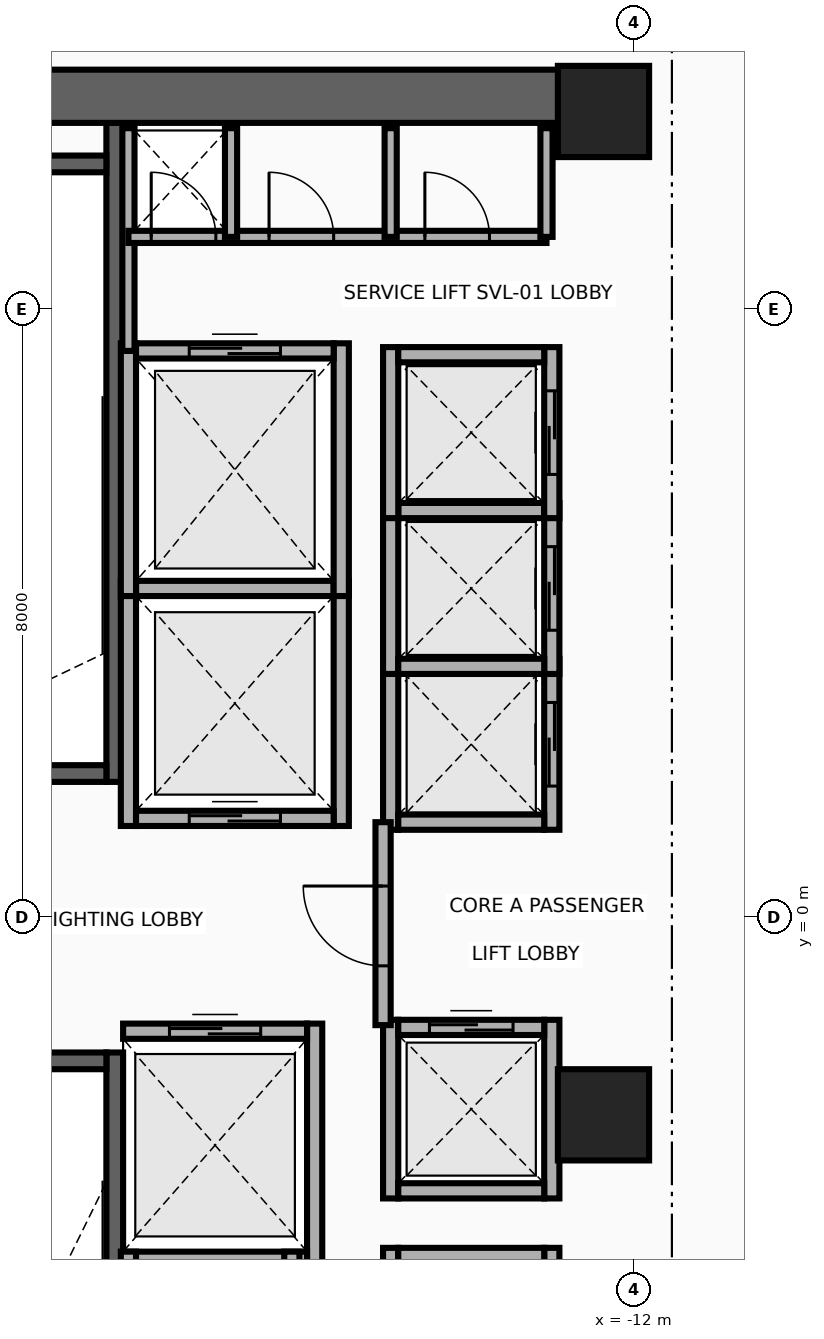
"""IFC4 building model, lengths in metres.
Left out: names, types, materials, properties, quantities, classifications, styles, units other than length and angle.
Written with IfcOpenShell. Run it as: python <this file> out.ifc"""

import sys

from ifc_helpers import new_model, si_unit, direction, frame, frame_2d, origin, origin_2d, place, context, subcontext, project, spatial, rectangle, extrude, source, transform, mapped, element, fill, save


model = new_model("IFC4")
c1 = context("Model", 3, precision=1e-05, world=origin(), true_north=direction((0.0, 1.0)))
c2 = subcontext(c1, "Body", "Model", "MODEL_VIEW")
j1 = project(units=[si_unit("LENGTHUNIT", "METRE"), si_unit("PLANEANGLEUNIT", "RADIAN")], contexts=[c1])
p1 = place(None, origin())
s1 = spatial("IfcSite", under=j1, at=p1, CompositionType="ELEMENT")
p2 = place(p1, origin())
s2 = spatial("IfcBuilding", under=s1, at=p2, CompositionType="ELEMENT")
p3 = place(p2, frame((0.0, 0.0, 101.1)))
s3 = spatial("IfcBuildingStorey", under=s2, at=p3, CompositionType="ELEMENT", Elevation=101.1)
p4 = place(p3, frame((-18.83, 1.78, 0.0), z_axis=(0.0, 0.0, 1.0), x_axis=(0.0, 1.0, 0.0)))
e1 = element("IfcWall", 1, at=p4, inside=s3, PredefinedType="SHEAR", context=c2, shape_type="SweptSolid", body=[
    extrude(rectangle(XDim=8.67, YDim=0.22, at=frame_2d((4.335, 0.0))), origin(), (0.0, 0.0, 1.0), 4.36),
])
p5 = place(p3, frame((-22.05, 1.89, 0.0), z_axis=(0.0, 0.0, 1.0), x_axis=(1.0, 0.0, 0.0)))
e2 = element("IfcWall", 2, at=p5, inside=s3, PredefinedType="SHEAR", context=c2, shape_type="SweptSolid", body=[
    extrude(rectangle(XDim=3.11, YDim=0.22, at=frame_2d((1.555, 0.0))), origin(), (0.0, 0.0, 1.0), 4.36),
])
p6 = place(p5, frame((1.0, 0.0, 0.0)))
e3 = element("IfcOpeningElement", 3, at=p6, cuts=e2, PredefinedType="OPENING", context=c2, shape_type="SweptSolid", body=[
    extrude(rectangle(XDim=1.1, YDim=2.15, at=frame_2d((0.55, 1.075))), frame((0.0, 0.125, 0.0), z_axis=(0.0, -1.0, 0.0), x_axis=(1.0, 0.0, 0.0)), (0.0, 0.0, 1.0), 0.25),
])
p7 = place(p3, frame((-22.05, 9.91, 0.0), z_axis=(0.0, 0.0, 1.0), x_axis=(1.0, 0.0, 0.0)))
e4 = element("IfcWall", 4, at=p7, inside=s3, PredefinedType="SHEAR", context=c2, shape_type="SweptSolid", body=[
    extrude(rectangle(XDim=3.11, YDim=0.22, at=frame_2d((1.555, 0.0))), origin(), (0.0, 0.0, 1.0), 4.36),
])
p8 = place(p3, frame((-18.83, -10.45, 0.0), z_axis=(0.0, 0.0, 1.0), x_axis=(0.0, 1.0, 0.0)))
e5 = element("IfcWall", 5, at=p8, inside=s3, PredefinedType="SHEAR", context=c2, shape_type="SweptSolid", body=[
    extrude(rectangle(XDim=8.67, YDim=0.22, at=frame_2d((4.335, 0.0))), origin(), (0.0, 0.0, 1.0), 4.36),
])
p9 = place(p3, frame((-22.05, -1.89, 0.0), z_axis=(0.0, 0.0, 1.0), x_axis=(1.0, 0.0, 0.0)))
e6 = element("IfcWall", 6, at=p9, inside=s3, PredefinedType="SHEAR", context=c2, shape_type="SweptSolid", body=[
    extrude(rectangle(XDim=3.11, YDim=0.22, at=frame_2d((1.555, 0.0))), origin(), (0.0, 0.0, 1.0), 4.36),
])
p10 = place(p9, frame((1.0, 0.0, 0.0)))
e7 = element("IfcOpeningElement", 7, at=p10, cuts=e6, PredefinedType="OPENING", context=c2, shape_type="SweptSolid", body=[
    extrude(rectangle(XDim=1.1, YDim=2.15, at=frame_2d((0.55, 1.075))), frame((0.0, 0.125, 0.0), z_axis=(0.0, -1.0, 0.0), x_axis=(1.0, 0.0, 0.0)), (0.0, 0.0, 1.0), 0.25),
])
p11 = place(p3, frame((-22.65, 10.8, 0.0), z_axis=(0.0, 0.0, 1.0), x_axis=(1.0, 0.0, 0.0)))
e8 = element("IfcWall", 8, at=p11, inside=s3, PredefinedType="SHEAR", context=c2, shape_type="SweptSolid", body=[
    extrude(rectangle(XDim=10.25, YDim=0.7, at=frame_2d((5.125, 0.0))), origin(), (0.0, 0.0, 1.0), 4.36),
])
m1 = source(origin(), c2, "Body", "SweptSolid", [
    extrude(rectangle(XDim=1.2, YDim=1.2, at=origin_2d()), origin(), (0.0, 0.0, 1.0), 4.6),
])
for number, where, z_axis, x_axis in (
    (9, (-12.4, -2.6, 0.0), (0.0, 0.0, 1.0), (1.0, 0.0, 0.0)),
    (10, (-12.4, 10.6, 0.0), (0.0, 0.0, 1.0), (1.0, 0.0, 0.0)),
):
    element("IfcColumn", number, at=place(p3, frame(where, z_axis=z_axis, x_axis=x_axis)), inside=s3, PredefinedType="COLUMN", context=c2, shape_type="MappedRepresentation", body=[
        mapped(m1, transform((0.0, 0.0, 0.0), x_axis=(1.0, 0.0, 0.0), y_axis=(0.0, 1.0, 0.0), z_axis=(0.0, 0.0, 1.0), scale=1.0)),
    ])
for number, where, z_axis, x_axis in (
    (11, (-18.65, 1.2, 0.0), (0.0, 0.0, 1.0), (0.0, 1.0, 0.0)),
    (12, (-15.85, 1.2, 0.0), (0.0, 0.0, 1.0), (0.0, 1.0, 0.0)),
):
    element("IfcWall", number, at=place(p3, frame(where, z_axis=z_axis, x_axis=x_axis)), inside=s3, PredefinedType="MOVABLE", context=c2, shape_type="SweptSolid", body=[
        extrude(rectangle(XDim=3.225, YDim=0.2, at=frame_2d((1.613, 0.0))), origin(), (0.0, 0.0, 1.0), 4.36),
    ])
p12 = place(p3, frame((-18.55, 1.3, 0.0), z_axis=(0.0, 0.0, 1.0), x_axis=(1.0, 0.0, 0.0)))
e13 = element("IfcWall", 13, at=p12, inside=s3, PredefinedType="MOVABLE", context=c2, shape_type="SweptSolid", body=[
    extrude(rectangle(XDim=2.6, YDim=0.2, at=frame_2d((1.3, 0.0))), origin(), (0.0, 0.0, 1.0), 4.36),
])
p13 = place(p12, frame((0.7, 0.0, 0.0)))
e14 = element("IfcOpeningElement", 14, at=p13, cuts=e13, PredefinedType="OPENING", context=c2, shape_type="SweptSolid", body=[
    extrude(rectangle(XDim=1.2, YDim=2.1, at=frame_2d((0.6, 1.05))), frame((0.0, 0.115, 0.0), z_axis=(0.0, -1.0, 0.0), x_axis=(1.0, 0.0, 0.0)), (0.0, 0.0, 1.0), 0.23),
])
p14 = place(p3, frame((-18.55, 4.325, 0.0), z_axis=(0.0, 0.0, 1.0), x_axis=(1.0, 0.0, 0.0)))
e15 = element("IfcWall", 15, at=p14, inside=s3, PredefinedType="MOVABLE", context=c2, shape_type="SweptSolid", body=[
    extrude(rectangle(XDim=2.6, YDim=0.2, at=frame_2d((1.3, 0.0))), origin(), (0.0, 0.0, 1.0), 4.36),
])
p15 = place(p3, frame((-16.2, -4.6, 0.0), z_axis=(0.0, 0.0, 1.0), x_axis=(0.0, 1.0, 0.0)))
e16 = element("IfcWall", 16, at=p15, inside=s3, PredefinedType="MOVABLE", context=c2, shape_type="SweptSolid", body=[
    extrude(rectangle(XDim=3.2, YDim=0.2, at=frame_2d((1.6, 0.0))), origin(), (0.0, 0.0, 1.0), 4.36),
])
p16 = place(p3, frame((-18.72, -4.5, 0.0), z_axis=(0.0, 0.0, 1.0), x_axis=(1.0, 0.0, 0.0)))
e17 = element("IfcWall", 17, at=p16, inside=s3, PredefinedType="MOVABLE", context=c2, shape_type="SweptSolid", body=[
    extrude(rectangle(XDim=2.42, YDim=0.2, at=frame_2d((1.21, 0.0))), origin(), (0.0, 0.0, 1.0), 4.36),
])
p17 = place(p3, frame((-18.72, -1.5, 0.0), z_axis=(0.0, 0.0, 1.0), x_axis=(1.0, 0.0, 0.0)))
e18 = element("IfcWall", 18, at=p17, inside=s3, PredefinedType="MOVABLE", context=c2, shape_type="SweptSolid", body=[
    extrude(rectangle(XDim=2.42, YDim=0.2, at=frame_2d((1.21, 0.0))), origin(), (0.0, 0.0, 1.0), 4.36),
])
p18 = place(p17, frame((0.61, 0.0, 0.0)))
e19 = element("IfcOpeningElement", 19, at=p18, cuts=e18, PredefinedType="OPENING", context=c2, shape_type="SweptSolid", body=[
    extrude(rectangle(XDim=1.2, YDim=2.1, at=frame_2d((0.6, 1.05))), frame((0.0, 0.115, 0.0), z_axis=(0.0, -1.0, 0.0), x_axis=(1.0, 0.0, 0.0)), (0.0, 0.0, 1.0), 0.23),
])
for number, where, z_axis, x_axis in (
    (20, (-18.65, 4.225, 0.0), (0.0, 0.0, 1.0), (0.0, 1.0, 0.0)),
    (21, (-15.85, 4.225, 0.0), (0.0, 0.0, 1.0), (0.0, 1.0, 0.0)),
):
    element("IfcWall", number, at=place(p3, frame(where, z_axis=z_axis, x_axis=x_axis)), inside=s3, PredefinedType="MOVABLE", context=c2, shape_type="SweptSolid", body=[
        extrude(rectangle(XDim=3.325, YDim=0.2, at=frame_2d((1.663, 0.0))), origin(), (0.0, 0.0, 1.0), 4.36),
    ])
p19 = place(p3, frame((-18.55, 7.45, 0.0), z_axis=(0.0, 0.0, 1.0), x_axis=(1.0, 0.0, 0.0)))
e22 = element("IfcWall", 22, at=p19, inside=s3, PredefinedType="MOVABLE", context=c2, shape_type="SweptSolid", body=[
    extrude(rectangle(XDim=2.6, YDim=0.2, at=frame_2d((1.3, 0.0))), origin(), (0.0, 0.0, 1.0), 4.36),
])
p20 = place(p19, frame((0.7, 0.0, 0.0)))
e23 = element("IfcOpeningElement", 23, at=p20, cuts=e22, PredefinedType="OPENING", context=c2, shape_type="SweptSolid", body=[
    extrude(rectangle(XDim=1.2, YDim=2.1, at=frame_2d((0.6, 1.05))), frame((0.0, 0.115, 0.0), z_axis=(0.0, -1.0, 0.0), x_axis=(1.0, 0.0, 0.0)), (0.0, 0.0, 1.0), 0.23),
])
for number, where, z_axis, x_axis in (
    (24, (-15.2, -6.7, 0.0), (0.0, 0.0, 1.0), (0.0, 1.0, 0.0)),
    (25, (-13.08, -6.7, 0.0), (0.0, 0.0, 1.0), (0.0, 1.0, 0.0)),
):
    element("IfcWall", number, at=place(p3, frame(where, z_axis=z_axis, x_axis=x_axis)), inside=s3, PredefinedType="MOVABLE", context=c2, shape_type="SweptSolid", body=[
        extrude(rectangle(XDim=2.35, YDim=0.2, at=frame_2d((1.175, 0.0))), origin(), (0.0, 0.0, 1.0), 4.36),
    ])
p21 = place(p3, frame((-15.1, -4.45, 0.0), z_axis=(0.0, 0.0, 1.0), x_axis=(1.0, 0.0, 0.0)))
e26 = element("IfcWall", 26, at=p21, inside=s3, PredefinedType="MOVABLE", context=c2, shape_type="SweptSolid", body=[
    extrude(rectangle(XDim=1.92, YDim=0.2, at=frame_2d((0.96, 0.0))), origin(), (0.0, 0.0, 1.0), 4.36),
])
p22 = place(p3, frame((-15.2, 1.15, 0.0), z_axis=(0.0, 0.0, 1.0), x_axis=(0.0, 1.0, 0.0)))
e27 = element("IfcWall", 27, at=p22, inside=s3, PredefinedType="MOVABLE", context=c2, shape_type="SweptSolid", body=[
    extrude(rectangle(XDim=2.25, YDim=0.2, at=frame_2d((1.125, 0.0))), origin(), (0.0, 0.0, 1.0), 4.36),
])
p23 = place(p3, frame((-13.08, 1.15, 0.0), z_axis=(0.0, 0.0, 1.0), x_axis=(0.0, 1.0, 0.0)))
e28 = element("IfcWall", 28, at=p23, inside=s3, PredefinedType="MOVABLE", context=c2, shape_type="SweptSolid", body=[
    extrude(rectangle(XDim=2.25, YDim=0.2, at=frame_2d((1.125, 0.0))), origin(), (0.0, 0.0, 1.0), 4.36),
])
p24 = place(p23, frame((0.575, 0.0, 0.0)))
e29 = element("IfcOpeningElement", 29, at=p24, cuts=e28, PredefinedType="OPENING", context=c2, shape_type="SweptSolid", body=[
    extrude(rectangle(XDim=1.1, YDim=2.1, at=frame_2d((0.55, 1.05))), frame((0.0, 0.115, 0.0), z_axis=(0.0, -1.0, 0.0), x_axis=(1.0, 0.0, 0.0)), (0.0, 0.0, 1.0), 0.23),
])
p25 = place(p3, frame((-15.1, 1.25, 0.0), z_axis=(0.0, 0.0, 1.0), x_axis=(1.0, 0.0, 0.0)))
e30 = element("IfcWall", 30, at=p25, inside=s3, PredefinedType="MOVABLE", context=c2, shape_type="SweptSolid", body=[
    extrude(rectangle(XDim=1.92, YDim=0.2, at=frame_2d((0.96, 0.0))), origin(), (0.0, 0.0, 1.0), 4.36),
])
p26 = place(p3, frame((-15.2, 3.2, 0.0), z_axis=(0.0, 0.0, 1.0), x_axis=(0.0, 1.0, 0.0)))
e31 = element("IfcWall", 31, at=p26, inside=s3, PredefinedType="MOVABLE", context=c2, shape_type="SweptSolid", body=[
    extrude(rectangle(XDim=2.25, YDim=0.2, at=frame_2d((1.125, 0.0))), origin(), (0.0, 0.0, 1.0), 4.36),
])
p27 = place(p3, frame((-13.08, 3.2, 0.0), z_axis=(0.0, 0.0, 1.0), x_axis=(0.0, 1.0, 0.0)))
e32 = element("IfcWall", 32, at=p27, inside=s3, PredefinedType="MOVABLE", context=c2, shape_type="SweptSolid", body=[
    extrude(rectangle(XDim=2.25, YDim=0.2, at=frame_2d((1.125, 0.0))), origin(), (0.0, 0.0, 1.0), 4.36),
])
p28 = place(p27, frame((0.575, 0.0, 0.0)))
e33 = element("IfcOpeningElement", 33, at=p28, cuts=e32, PredefinedType="OPENING", context=c2, shape_type="SweptSolid", body=[
    extrude(rectangle(XDim=1.1, YDim=2.1, at=frame_2d((0.55, 1.05))), frame((0.0, 0.115, 0.0), z_axis=(0.0, -1.0, 0.0), x_axis=(1.0, 0.0, 0.0)), (0.0, 0.0, 1.0), 0.23),
])
for number, where, z_axis, x_axis in (
    (34, (-15.1, 3.3, 0.0), (0.0, 0.0, 1.0), (1.0, 0.0, 0.0)),
    (35, (-15.1, 5.35, 0.0), (0.0, 0.0, 1.0), (1.0, 0.0, 0.0)),
):
    element("IfcWall", number, at=place(p3, frame(where, z_axis=z_axis, x_axis=x_axis)), inside=s3, PredefinedType="MOVABLE", context=c2, shape_type="SweptSolid", body=[
        extrude(rectangle(XDim=1.92, YDim=0.2, at=frame_2d((0.96, 0.0))), origin(), (0.0, 0.0, 1.0), 4.36),
    ])
p29 = place(p3, frame((-15.2, 5.25, 0.0), z_axis=(0.0, 0.0, 1.0), x_axis=(0.0, 1.0, 0.0)))
e36 = element("IfcWall", 36, at=p29, inside=s3, PredefinedType="MOVABLE", context=c2, shape_type="SweptSolid", body=[
    extrude(rectangle(XDim=2.25, YDim=0.2, at=frame_2d((1.125, 0.0))), origin(), (0.0, 0.0, 1.0), 4.36),
])
p30 = place(p3, frame((-13.08, 5.25, 0.0), z_axis=(0.0, 0.0, 1.0), x_axis=(0.0, 1.0, 0.0)))
e37 = element("IfcWall", 37, at=p30, inside=s3, PredefinedType="MOVABLE", context=c2, shape_type="SweptSolid", body=[
    extrude(rectangle(XDim=2.25, YDim=0.2, at=frame_2d((1.125, 0.0))), origin(), (0.0, 0.0, 1.0), 4.36),
])
p31 = place(p30, frame((0.575, 0.0, 0.0)))
e38 = element("IfcOpeningElement", 38, at=p31, cuts=e37, PredefinedType="OPENING", context=c2, shape_type="SweptSolid", body=[
    extrude(rectangle(XDim=1.1, YDim=2.1, at=frame_2d((0.55, 1.05))), frame((0.0, 0.115, 0.0), z_axis=(0.0, -1.0, 0.0), x_axis=(1.0, 0.0, 0.0)), (0.0, 0.0, 1.0), 0.23),
])
p32 = place(p3, frame((-15.1, 7.4, 0.0), z_axis=(0.0, 0.0, 1.0), x_axis=(1.0, 0.0, 0.0)))
e39 = element("IfcWall", 39, at=p32, inside=s3, PredefinedType="MOVABLE", context=c2, shape_type="SweptSolid", body=[
    extrude(rectangle(XDim=1.92, YDim=0.2, at=frame_2d((0.96, 0.0))), origin(), (0.0, 0.0, 1.0), 4.36),
])
for number, where, z_axis, x_axis in (
    (40, (-18.65, -6.7, 0.0), (0.0, 0.0, 1.0), (0.0, 1.0, 0.0)),
    (41, (-16.5, -6.7, 0.0), (0.0, 0.0, 1.0), (0.0, 1.0, 0.0)),
):
    element("IfcWall", number, at=place(p3, frame(where, z_axis=z_axis, x_axis=x_axis)), inside=s3, PredefinedType="MOVABLE", context=c2, shape_type="SweptSolid", body=[
        extrude(rectangle(XDim=2.3, YDim=0.2, at=frame_2d((1.15, 0.0))), origin(), (0.0, 0.0, 1.0), 4.36),
    ])
for number, where, z_axis, x_axis in (
    (42, (-15.2, -3.7, 0.0), (0.0, 0.0, 1.0), (0.0, 1.0, 0.0)),
    (43, (-13.08, -3.7, 0.0), (0.0, 0.0, 1.0), (0.0, 1.0, 0.0)),
):
    element("IfcWall", number, at=place(p3, frame(where, z_axis=z_axis, x_axis=x_axis)), inside=s3, PredefinedType="MOVABLE", context=c2, shape_type="SweptSolid", body=[
        extrude(rectangle(XDim=2.35, YDim=0.2, at=frame_2d((1.175, 0.0))), origin(), (0.0, 0.0, 1.0), 4.36),
    ])
p33 = place(p3, frame((-15.1, -3.6, 0.0), z_axis=(0.0, 0.0, 1.0), x_axis=(1.0, 0.0, 0.0)))
e44 = element("IfcWall", 44, at=p33, inside=s3, PredefinedType="MOVABLE", context=c2, shape_type="SweptSolid", body=[
    extrude(rectangle(XDim=1.92, YDim=0.2, at=frame_2d((0.96, 0.0))), origin(), (0.0, 0.0, 1.0), 4.36),
])
p34 = place(p3, frame((-15.1, -1.45, 0.0), z_axis=(0.0, 0.0, 1.0), x_axis=(1.0, 0.0, 0.0)))
e45 = element("IfcWall", 45, at=p34, inside=s3, PredefinedType="MOVABLE", context=c2, shape_type="SweptSolid", body=[
    extrude(rectangle(XDim=1.92, YDim=0.2, at=frame_2d((0.96, 0.0))), origin(), (0.0, 0.0, 1.0), 4.36),
])
p35 = place(p34, frame((0.41, 0.0, 0.0)))
e46 = element("IfcOpeningElement", 46, at=p35, cuts=e45, PredefinedType="OPENING", context=c2, shape_type="SweptSolid", body=[
    extrude(rectangle(XDim=1.1, YDim=2.1, at=frame_2d((0.55, 1.05))), frame((0.0, 0.115, 0.0), z_axis=(0.0, -1.0, 0.0), x_axis=(1.0, 0.0, 0.0)), (0.0, 0.0, 1.0), 0.23),
])
p36 = place(p3, frame((-15.3, -1.42, 0.0), z_axis=(0.0, 0.0, 1.0), x_axis=(0.0, 1.0, 0.0)))
e47 = element("IfcWall", 47, at=p36, inside=s3, PredefinedType="PARTITIONING", context=c2, shape_type="SweptSolid", body=[
    extrude(rectangle(XDim=2.67, YDim=0.2, at=frame_2d((1.335, 0.0))), origin(), (0.0, 0.0, 1.0), 4.36),
])
p37 = place(p36, frame((0.78, 0.0, 0.0)))
e48 = element("IfcOpeningElement", 48, at=p37, cuts=e47, PredefinedType="OPENING", context=c2, shape_type="SweptSolid", body=[
    extrude(rectangle(XDim=1.05, YDim=2.15, at=frame_2d((0.525, 1.075))), frame((0.0, 0.115, 0.0), z_axis=(0.0, -1.0, 0.0), x_axis=(1.0, 0.0, 0.0)), (0.0, 0.0, 1.0), 0.23),
])
p38 = place(p3, frame((-18.65, 7.45, 0.0), z_axis=(0.0, 0.0, 1.0), x_axis=(0.0, 1.0, 0.0)))
e49 = element("IfcWall", 49, at=p38, inside=s3, PredefinedType="PARTITIONING", context=c2, shape_type="SweptSolid", body=[
    extrude(rectangle(XDim=2.93, YDim=0.16, at=frame_2d((1.465, 0.0))), origin(), (0.0, 0.0, 1.0), 4.36),
])
p39 = place(p3, frame((-18.65, 8.95, 0.0), z_axis=(0.0, 0.0, 1.0), x_axis=(1.0, 0.0, 0.0)))
e50 = element("IfcWall", 50, at=p39, inside=s3, PredefinedType="PARTITIONING", context=c2, shape_type="SweptSolid", body=[
    extrude(rectangle(XDim=5.5, YDim=0.16, at=frame_2d((2.75, 0.0))), origin(), (0.0, 0.0, 1.0), 4.36),
])
p40 = place(p39, frame((0.3, 0.0, 0.0)))
e51 = element("IfcOpeningElement", 51, at=p40, cuts=e50, PredefinedType="OPENING", context=c2, shape_type="SweptSolid", body=[
    extrude(rectangle(XDim=0.85, YDim=2.05, at=frame_2d((0.425, 1.025))), frame((0.0, 0.095, 0.0), z_axis=(0.0, -1.0, 0.0), x_axis=(1.0, 0.0, 0.0)), (0.0, 0.0, 1.0), 0.19),
])
p41 = place(p39, frame((1.85, 0.0, 0.0)))
e52 = element("IfcOpeningElement", 52, at=p41, cuts=e50, PredefinedType="OPENING", context=c2, shape_type="SweptSolid", body=[
    extrude(rectangle(XDim=0.85, YDim=2.05, at=frame_2d((0.425, 1.025))), frame((0.0, 0.095, 0.0), z_axis=(0.0, -1.0, 0.0), x_axis=(1.0, 0.0, 0.0)), (0.0, 0.0, 1.0), 0.19),
])
p42 = place(p39, frame((3.9, 0.0, 0.0)))
e53 = element("IfcOpeningElement", 53, at=p42, cuts=e50, PredefinedType="OPENING", context=c2, shape_type="SweptSolid", body=[
    extrude(rectangle(XDim=0.85, YDim=2.05, at=frame_2d((0.425, 1.025))), frame((0.0, 0.095, 0.0), z_axis=(0.0, -1.0, 0.0), x_axis=(1.0, 0.0, 0.0)), (0.0, 0.0, 1.0), 0.19),
])
for number, where, z_axis, x_axis in (
    (54, (-13.15, 8.95, 0.0), (0.0, 0.0, 1.0), (0.0, 1.0, 0.0)),
    (55, (-17.3, 8.95, 0.0), (0.0, 0.0, 1.0), (0.0, 1.0, 0.0)),
    (56, (-15.2, 8.95, 0.0), (0.0, 0.0, 1.0), (0.0, 1.0, 0.0)),
):
    element("IfcWall", number, at=place(p3, frame(where, z_axis=z_axis, x_axis=x_axis)), inside=s3, PredefinedType="PARTITIONING", context=c2, shape_type="SweptSolid", body=[
        extrude(rectangle(XDim=1.43, YDim=0.16, at=frame_2d((0.715, 0.0))), origin(), (0.0, 0.0, 1.0), 4.36),
    ])
p43 = place(p13, origin())
e57 = element("IfcDoor", 57, at=p43, inside=s3, OperationType="DOUBLE_DOOR_SLIDING", PredefinedType="DOOR", context=c2, shape_type="SweptSolid", body=[
    extrude(rectangle(XDim=1.2, YDim=2.1, at=frame_2d((0.6, 1.05))), frame((0.0, 0.025, 0.0), z_axis=(0.0, -1.0, 0.0), x_axis=(1.0, 0.0, 0.0)), (0.0, 0.0, 1.0), 0.05),
])
fill(e14, e57)
p44 = place(p18, origin())
e58 = element("IfcDoor", 58, at=p44, inside=s3, OperationType="DOUBLE_DOOR_SLIDING", PredefinedType="DOOR", context=c2, shape_type="SweptSolid", body=[
    extrude(rectangle(XDim=1.2, YDim=2.1, at=frame_2d((0.6, 1.05))), frame((0.0, 0.025, 0.0), z_axis=(0.0, -1.0, 0.0), x_axis=(1.0, 0.0, 0.0)), (0.0, 0.0, 1.0), 0.05),
])
fill(e19, e58)
p45 = place(p20, origin())
e59 = element("IfcDoor", 59, at=p45, inside=s3, OperationType="DOUBLE_DOOR_SLIDING", PredefinedType="DOOR", context=c2, shape_type="SweptSolid", body=[
    extrude(rectangle(XDim=1.2, YDim=2.1, at=frame_2d((0.6, 1.05))), frame((0.0, 0.025, 0.0), z_axis=(0.0, -1.0, 0.0), x_axis=(1.0, 0.0, 0.0)), (0.0, 0.0, 1.0), 0.05),
])
fill(e23, e59)
p46 = place(p24, origin())
e60 = element("IfcDoor", 60, at=p46, inside=s3, OperationType="DOUBLE_DOOR_SLIDING", PredefinedType="DOOR", context=c2, shape_type="SweptSolid", body=[
    extrude(rectangle(XDim=1.1, YDim=2.1, at=frame_2d((0.55, 1.05))), frame((0.0, 0.025, 0.0), z_axis=(0.0, -1.0, 0.0), x_axis=(1.0, 0.0, 0.0)), (0.0, 0.0, 1.0), 0.05),
])
fill(e29, e60)
p47 = place(p28, origin())
e61 = element("IfcDoor", 61, at=p47, inside=s3, OperationType="DOUBLE_DOOR_SLIDING", PredefinedType="DOOR", context=c2, shape_type="SweptSolid", body=[
    extrude(rectangle(XDim=1.1, YDim=2.1, at=frame_2d((0.55, 1.05))), frame((0.0, 0.025, 0.0), z_axis=(0.0, -1.0, 0.0), x_axis=(1.0, 0.0, 0.0)), (0.0, 0.0, 1.0), 0.05),
])
fill(e33, e61)
p48 = place(p31, origin())
e62 = element("IfcDoor", 62, at=p48, inside=s3, OperationType="DOUBLE_DOOR_SLIDING", PredefinedType="DOOR", context=c2, shape_type="SweptSolid", body=[
    extrude(rectangle(XDim=1.1, YDim=2.1, at=frame_2d((0.55, 1.05))), frame((0.0, 0.025, 0.0), z_axis=(0.0, -1.0, 0.0), x_axis=(1.0, 0.0, 0.0)), (0.0, 0.0, 1.0), 0.05),
])
fill(e38, e62)
p49 = place(p35, origin())
e63 = element("IfcDoor", 63, at=p49, inside=s3, OperationType="DOUBLE_DOOR_SLIDING", PredefinedType="DOOR", context=c2, shape_type="SweptSolid", body=[
    extrude(rectangle(XDim=1.1, YDim=2.1, at=frame_2d((0.55, 1.05))), frame((0.0, 0.025, 0.0), z_axis=(0.0, -1.0, 0.0), x_axis=(1.0, 0.0, 0.0)), (0.0, 0.0, 1.0), 0.05),
])
fill(e46, e63)
p50 = place(p37, origin())
e64 = element("IfcDoor", 64, at=p50, inside=s3, OperationType="SINGLE_SWING_RIGHT", PredefinedType="DOOR", context=c2, shape_type="SweptSolid", body=[
    extrude(rectangle(XDim=1.05, YDim=2.15, at=frame_2d((0.525, 1.075))), frame((0.0, 0.025, 0.0), z_axis=(0.0, -1.0, 0.0), x_axis=(1.0, 0.0, 0.0)), (0.0, 0.0, 1.0), 0.05),
])
fill(e48, e64)
p51 = place(p40, origin())
e65 = element("IfcDoor", 65, at=p51, inside=s3, OperationType="SINGLE_SWING_LEFT", PredefinedType="DOOR", context=c2, shape_type="SweptSolid", body=[
    extrude(rectangle(XDim=0.85, YDim=2.05, at=frame_2d((0.425, 1.025))), frame((0.0, 0.025, 0.0), z_axis=(0.0, -1.0, 0.0), x_axis=(1.0, 0.0, 0.0)), (0.0, 0.0, 1.0), 0.05),
])
fill(e51, e65)
p52 = place(p41, origin())
e66 = element("IfcDoor", 66, at=p52, inside=s3, OperationType="SINGLE_SWING_RIGHT", PredefinedType="DOOR", context=c2, shape_type="SweptSolid", body=[
    extrude(rectangle(XDim=0.85, YDim=2.05, at=frame_2d((0.425, 1.025))), frame((0.0, 0.025, 0.0), z_axis=(0.0, -1.0, 0.0), x_axis=(1.0, 0.0, 0.0)), (0.0, 0.0, 1.0), 0.05),
])
fill(e52, e66)
p53 = place(p42, origin())
e67 = element("IfcDoor", 67, at=p53, inside=s3, OperationType="SINGLE_SWING_LEFT", PredefinedType="DOOR", context=c2, shape_type="SweptSolid", body=[
    extrude(rectangle(XDim=0.85, YDim=2.05, at=frame_2d((0.425, 1.025))), frame((0.0, 0.025, 0.0), z_axis=(0.0, -1.0, 0.0), x_axis=(1.0, 0.0, 0.0)), (0.0, 0.0, 1.0), 0.05),
])
fill(e53, e67)
save(model, sys.argv[1])
